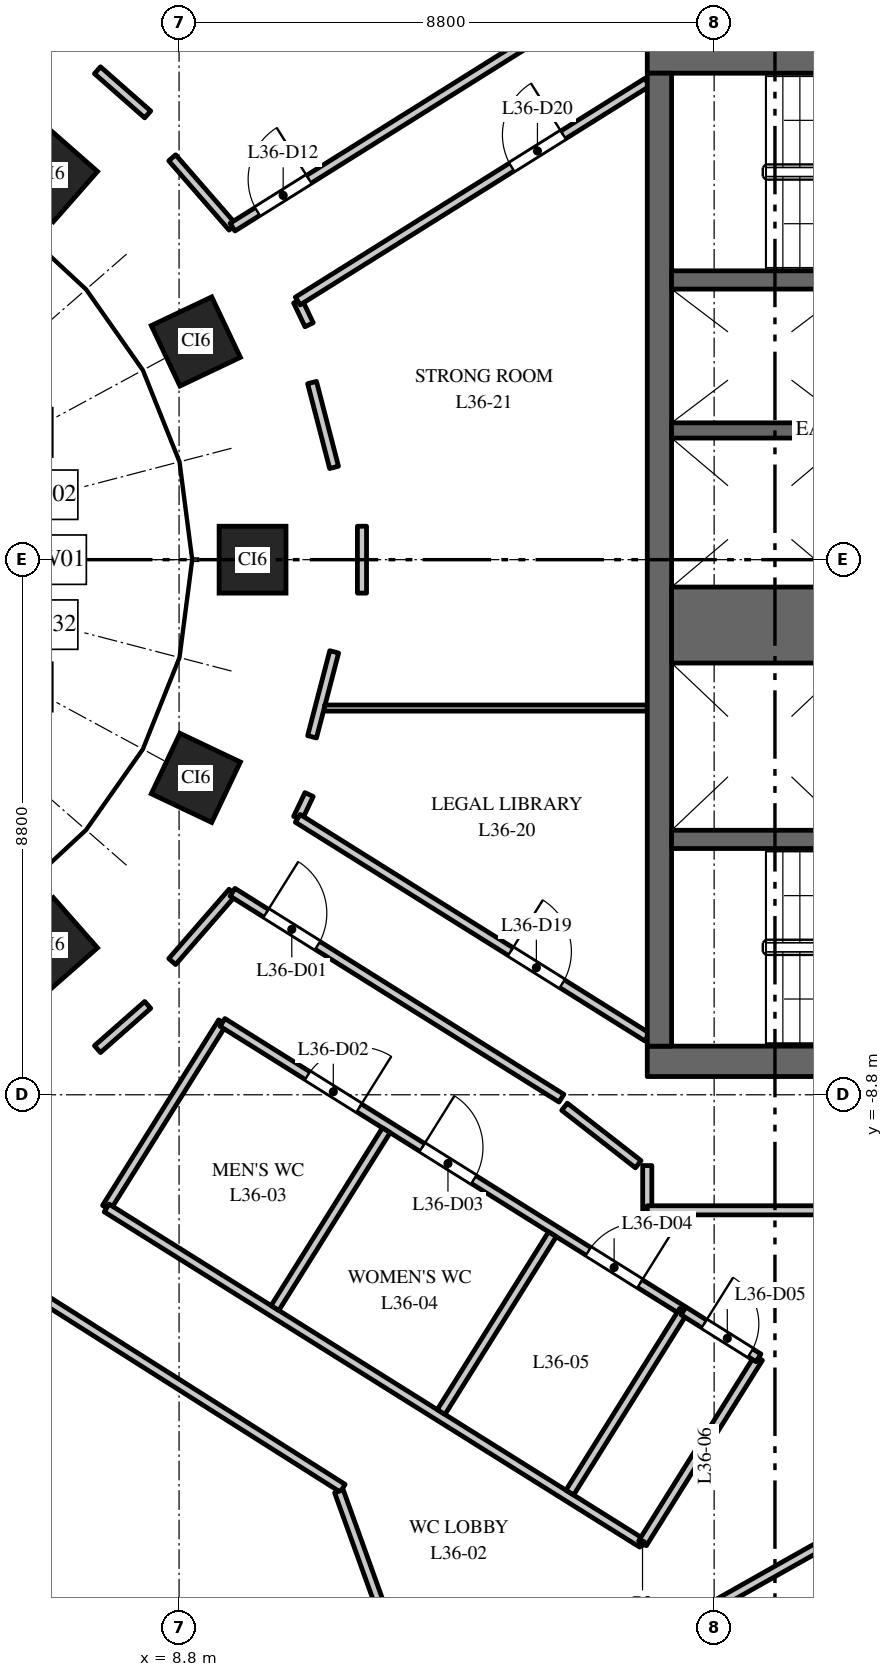
"""IFC4 building model, lengths in metres.
Left out: names, types, materials, properties, quantities, classifications, styles, units other than length and angle.
Written with IfcOpenShell. Run it as: python <this file> out.ifc"""

import sys

from ifc_helpers import new_model, si_unit, direction, frame, frame_2d, origin, origin_2d, place, context, subcontext, project, spatial, rectangle, extrude, element, fill, save


model = new_model("IFC4")
c1 = context("Model", 3, precision=1e-05, world=origin(), true_north=direction((0.0, 1.0)))
c2 = subcontext(c1, "Body", "Model", "MODEL_VIEW")
j1 = project(units=[si_unit("LENGTHUNIT", "METRE"), si_unit("PLANEANGLEUNIT", "RADIAN")], contexts=[c1])
p1 = place(None, origin())
s1 = spatial("IfcSite", under=j1, at=p1, CompositionType="ELEMENT")
p2 = place(p1, origin())
s2 = spatial("IfcBuilding", under=s1, at=p2, CompositionType="ELEMENT")
p3 = place(p2, frame((0.0, 0.0, 158.0)))
s3 = spatial("IfcBuildingStorey", under=s2, at=p3, CompositionType="ELEMENT", Elevation=158.0)
for number, where, z_axis, x_axis in (
    (1, (10.008, 0.0, 0.0), (0.0, 0.0, 1.0), (0.0, 1.0, 0.0)),
    (2, (9.076, 3.588, 0.0), (0.0, 0.0, 1.0), (-0.429, 0.903, 0.0)),
    (3, (6.682, 6.334, 0.0), (0.0, 0.0, 1.0), (-0.751, 0.66, 0.0)),
    (4, (6.682, -6.334, 0.0), (0.0, 0.0, 1.0), (0.751, 0.66, 0.0)),
    (5, (9.076, -3.588, 0.0), (0.0, 0.0, 1.0), (0.429, 0.903, 0.0)),
):
    element("IfcColumn", number, at=place(p3, frame(where, z_axis=z_axis, x_axis=x_axis)), inside=s3, PredefinedType="COLUMN", context=c2, shape_type="SweptSolid", body=[
        extrude(rectangle(XDim=1.1, YDim=1.1, at=origin_2d()), origin(), (0.0, 0.0, 1.0), 4.0),
    ])
p4 = place(p3, frame((16.5, 8.25, 0.0), z_axis=(0.0, 0.0, 1.0), x_axis=(1.0, 0.0, 0.0)))
e6 = element("IfcWall", 6, at=p4, inside=s3, PredefinedType="SHEAR", context=c2, shape_type="SweptSolid", body=[
    extrude(rectangle(XDim=15.0, YDim=0.5, at=frame_2d((7.5, 0.0))), origin(), (0.0, 0.0, 1.0), 3.7),
])
p5 = place(p4, frame((6.9, 0.0, 0.0)))
e7 = element("IfcOpeningElement", 7, at=p5, cuts=e6, PredefinedType="OPENING", context=c2, shape_type="SweptSolid", body=[
    extrude(rectangle(XDim=1.2, YDim=2.1, at=frame_2d((0.6, 1.05))), frame((0.0, 0.26, 0.0), z_axis=(0.0, -1.0, 0.0), x_axis=(1.0, 0.0, 0.0)), (0.0, 0.0, 1.0), 0.52),
])
p6 = place(p4, frame((12.425, 0.0, 0.0)))
e8 = element("IfcOpeningElement", 8, at=p6, cuts=e6, PredefinedType="OPENING", context=c2, shape_type="SweptSolid", body=[
    extrude(rectangle(XDim=0.9, YDim=2.1, at=frame_2d((0.45, 1.05))), frame((0.0, 0.26, 0.0), z_axis=(0.0, -1.0, 0.0), x_axis=(1.0, 0.0, 0.0)), (0.0, 0.0, 1.0), 0.52),
])
p7 = place(p3, frame((16.5, -8.25, 0.0), z_axis=(0.0, 0.0, 1.0), x_axis=(1.0, 0.0, 0.0)))
e9 = element("IfcWall", 9, at=p7, inside=s3, PredefinedType="SHEAR", context=c2, shape_type="SweptSolid", body=[
    extrude(rectangle(XDim=15.0, YDim=0.5, at=frame_2d((7.5, 0.0))), origin(), (0.0, 0.0, 1.0), 3.7),
])
p8 = place(p7, frame((6.9, 0.0, 0.0)))
e10 = element("IfcOpeningElement", 10, at=p8, cuts=e9, PredefinedType="OPENING", context=c2, shape_type="SweptSolid", body=[
    extrude(rectangle(XDim=1.2, YDim=2.1, at=frame_2d((0.6, 1.05))), frame((0.0, 0.26, 0.0), z_axis=(0.0, -1.0, 0.0), x_axis=(1.0, 0.0, 0.0)), (0.0, 0.0, 1.0), 0.52),
])
p9 = place(p7, frame((12.05, 0.0, 0.0)))
e11 = element("IfcOpeningElement", 11, at=p9, cuts=e9, PredefinedType="OPENING", context=c2, shape_type="SweptSolid", body=[
    extrude(rectangle(XDim=0.9, YDim=2.1, at=frame_2d((0.45, 1.05))), frame((0.0, 0.26, 0.0), z_axis=(0.0, -1.0, 0.0), x_axis=(1.0, 0.0, 0.0)), (0.0, 0.0, 1.0), 0.52),
])
p10 = place(p3, frame((16.7, -8.0, 0.0), z_axis=(0.0, 0.0, 1.0), x_axis=(0.0, 1.0, 0.0)))
e12 = element("IfcWall", 12, at=p10, inside=s3, PredefinedType="SHEAR", context=c2, shape_type="SweptSolid", body=[
    extrude(rectangle(XDim=16.0, YDim=0.4, at=frame_2d((8.0, 0.0))), origin(), (0.0, 0.0, 1.0), 3.7),
])
p11 = place(p3, frame((16.9, -1.075, 0.0), z_axis=(0.0, 0.0, 1.0), x_axis=(1.0, 0.0, 0.0)))
e13 = element("IfcWall", 13, at=p11, inside=s3, PredefinedType="SHEAR", context=c2, shape_type="SweptSolid", body=[
    extrude(rectangle(XDim=2.9, YDim=1.25, at=frame_2d((1.45, 0.0))), origin(), (0.0, 0.0, 1.0), 3.7),
])
p12 = place(p3, frame((16.9, 2.125, 0.0), z_axis=(0.0, 0.0, 1.0), x_axis=(1.0, 0.0, 0.0)))
e14 = element("IfcWall", 14, at=p12, inside=s3, PredefinedType="SHEAR", context=c2, shape_type="SweptSolid", body=[
    extrude(rectangle(XDim=2.9, YDim=0.25, at=frame_2d((1.45, 0.0))), origin(), (0.0, 0.0, 1.0), 3.7),
])
p13 = place(p3, frame((16.9, 4.6, 0.0), z_axis=(0.0, 0.0, 1.0), x_axis=(1.0, 0.0, 0.0)))
e15 = element("IfcWall", 15, at=p13, inside=s3, PredefinedType="SHEAR", context=c2, shape_type="SweptSolid", body=[
    extrude(rectangle(XDim=6.18, YDim=0.3, at=frame_2d((3.09, 0.0))), origin(), (0.0, 0.0, 1.0), 3.7),
])
p14 = place(p13, frame((4.9, 0.0, 0.0)))
e16 = element("IfcOpeningElement", 16, at=p14, cuts=e15, PredefinedType="OPENING", context=c2, shape_type="SweptSolid", body=[
    extrude(rectangle(XDim=1.1, YDim=2.1, at=frame_2d((0.55, 1.05))), frame((0.0, 0.16, 0.0), z_axis=(0.0, -1.0, 0.0), x_axis=(1.0, 0.0, 0.0)), (0.0, 0.0, 1.0), 0.32),
])
p15 = place(p3, frame((16.9, -4.6, 0.0), z_axis=(0.0, 0.0, 1.0), x_axis=(1.0, 0.0, 0.0)))
e17 = element("IfcWall", 17, at=p15, inside=s3, PredefinedType="SHEAR", context=c2, shape_type="SweptSolid", body=[
    extrude(rectangle(XDim=6.18, YDim=0.3, at=frame_2d((3.09, 0.0))), origin(), (0.0, 0.0, 1.0), 3.7),
])
p16 = place(p15, frame((4.9, 0.0, 0.0)))
e18 = element("IfcOpeningElement", 18, at=p16, cuts=e17, PredefinedType="OPENING", context=c2, shape_type="SweptSolid", body=[
    extrude(rectangle(XDim=1.1, YDim=2.1, at=frame_2d((0.55, 1.05))), frame((0.0, 0.16, 0.0), z_axis=(0.0, -1.0, 0.0), x_axis=(1.0, 0.0, 0.0)), (0.0, 0.0, 1.0), 0.32),
])
p17 = place(p3, frame((3.036, -9.915, 0.0), z_axis=(0.0, 0.0, 1.0), x_axis=(0.844814664865, -0.535059045367, 0.0)))
e19 = element("IfcWall", 19, at=p17, inside=s3, PredefinedType="PARTITIONING", context=c2, shape_type="SweptSolid", body=[
    extrude(rectangle(XDim=10.008, YDim=0.15, at=frame_2d((5.004, 0.0))), origin(), (0.0, 0.0, 1.0), 2.85),
])
for number, where, z_axis, x_axis in (
    (20, (7.458, -8.049, 0.0), (0.0, 0.0, 1.0), (0.751, 0.661, 0.0)),
    (21, (7.458, 8.049, 0.0), (0.0, 0.0, 1.0), (0.751, -0.661, 0.0)),
):
    element("IfcWall", number, at=place(p3, frame(where, z_axis=z_axis, x_axis=x_axis)), inside=s3, PredefinedType="PARTITIONING", context=c2, shape_type="SweptSolid", body=[
        extrude(rectangle(XDim=1.1, YDim=0.15, at=frame_2d((0.55, 0.0))), origin(), (0.0, 0.0, 1.0), 3.7),
    ])
p18 = place(p3, frame((7.605, -10.659, 0.0), z_axis=(0.0, 0.0, 1.0), x_axis=(0.530602380468, 0.847620855006, 0.0)))
e22 = element("IfcWall", 22, at=p18, inside=s3, PredefinedType="PARTITIONING", context=c2, shape_type="SweptSolid", body=[
    extrude(rectangle(XDim=3.6, YDim=0.15, at=frame_2d((1.8, 0.0))), origin(), (0.0, 0.0, 1.0), 3.7),
])
p19 = place(p3, frame((7.608, -10.661, 0.0), z_axis=(0.0, 0.0, 1.0), x_axis=(0.847562482532, -0.530695617284, 0.0)))
e23 = element("IfcWall", 23, at=p19, inside=s3, PredefinedType="PARTITIONING", context=c2, shape_type="SweptSolid", body=[
    extrude(rectangle(XDim=10.392, YDim=0.15, at=frame_2d((5.196, 0.0))), origin(), (0.0, 0.0, 1.0), 3.7),
])
for number, where, z_axis, x_axis in (
    (24, (8.687, -6.609, 0.0), (0.0, 0.0, 1.0), (0.656, 0.754, 0.0)),
    (25, (8.687, 6.609, 0.0), (0.0, 0.0, 1.0), (0.656, -0.754, 0.0)),
):
    element("IfcWall", number, at=place(p3, frame(where, z_axis=z_axis, x_axis=x_axis)), inside=s3, PredefinedType="PARTITIONING", context=c2, shape_type="SweptSolid", body=[
        extrude(rectangle(XDim=1.511, YDim=0.15, at=frame_2d((0.755, 0.0))), origin(), (0.0, 0.0, 1.0), 3.7),
    ])
p20 = place(p3, frame((9.514, -7.61, 0.0), z_axis=(0.0, 0.0, 1.0), x_axis=(0.847740567707, -0.530411095155, 0.0)))
e26 = element("IfcWall", 26, at=p20, inside=s3, PredefinedType="PARTITIONING", context=c2, shape_type="SweptSolid", body=[
    extrude(rectangle(XDim=8.944, YDim=0.15, at=frame_2d((4.472, 0.0))), origin(), (0.0, 0.0, 1.0), 3.7),
])
p21 = place(p20, frame((1.65, 0.0, 0.0)))
e27 = element("IfcOpeningElement", 27, at=p21, cuts=e26, PredefinedType="OPENING", context=c2, shape_type="SweptSolid", body=[
    extrude(rectangle(XDim=1.0, YDim=2.1, at=frame_2d((0.5, 1.05))), frame((0.0, 0.085, 0.0), z_axis=(0.0, -1.0, 0.0), x_axis=(1.0, 0.0, 0.0)), (0.0, 0.0, 1.0), 0.17),
])
p22 = place(p20, frame((3.874, 0.0, 0.0)))
e28 = element("IfcOpeningElement", 28, at=p22, cuts=e26, PredefinedType="OPENING", context=c2, shape_type="SweptSolid", body=[
    extrude(rectangle(XDim=1.0, YDim=2.1, at=frame_2d((0.5, 1.05))), frame((0.0, 0.085, 0.0), z_axis=(0.0, -1.0, 0.0), x_axis=(1.0, 0.0, 0.0)), (0.0, 0.0, 1.0), 0.17),
])
p23 = place(p20, frame((7.098, 0.0, 0.0)))
e29 = element("IfcOpeningElement", 29, at=p23, cuts=e26, PredefinedType="OPENING", context=c2, shape_type="SweptSolid", body=[
    extrude(rectangle(XDim=1.0, YDim=2.1, at=frame_2d((0.5, 1.05))), frame((0.0, 0.085, 0.0), z_axis=(0.0, -1.0, 0.0), x_axis=(1.0, 0.0, 0.0)), (0.0, 0.0, 1.0), 0.17),
])
p24 = place(p3, frame((9.679, -5.469, 0.0), z_axis=(0.0, 0.0, 1.0), x_axis=(0.847602682855, -0.530631408811, 0.0)))
e30 = element("IfcWall", 30, at=p24, inside=s3, PredefinedType="PARTITIONING", context=c2, shape_type="SweptSolid", body=[
    extrude(rectangle(XDim=6.383, YDim=0.15, at=frame_2d((3.191, 0.0))), origin(), (0.0, 0.0, 1.0), 3.7),
])
p25 = place(p24, frame((0.65, 0.0, 0.0)))
e31 = element("IfcOpeningElement", 31, at=p25, cuts=e30, PredefinedType="OPENING", context=c2, shape_type="SweptSolid", body=[
    extrude(rectangle(XDim=1.0, YDim=2.1, at=frame_2d((0.5, 1.05))), frame((0.0, 0.085, 0.0), z_axis=(0.0, -1.0, 0.0), x_axis=(1.0, 0.0, 0.0)), (0.0, 0.0, 1.0), 0.17),
])
p26 = place(p3, frame((9.679, 5.469, 0.0), z_axis=(0.0, 0.0, 1.0), x_axis=(0.847602682855, 0.530631408811, 0.0)))
e32 = element("IfcWall", 32, at=p26, inside=s3, PredefinedType="PARTITIONING", context=c2, shape_type="SweptSolid", body=[
    extrude(rectangle(XDim=6.383, YDim=0.15, at=frame_2d((3.191, 0.0))), origin(), (0.0, 0.0, 1.0), 3.7),
])
p27 = place(p26, frame((0.483, 0.0, 0.0)))
e33 = element("IfcOpeningElement", 33, at=p27, cuts=e32, PredefinedType="OPENING", context=c2, shape_type="SweptSolid", body=[
    extrude(rectangle(XDim=1.0, YDim=2.1, at=frame_2d((0.5, 1.05))), frame((0.0, 0.085, 0.0), z_axis=(0.0, -1.0, 0.0), x_axis=(1.0, 0.0, 0.0)), (0.0, 0.0, 1.0), 0.17),
])
p28 = place(p3, frame((10.377, -12.306, 0.0), z_axis=(0.0, 0.0, 1.0), x_axis=(0.530889428354, 0.847441098167, 0.0)))
e34 = element("IfcWall", 34, at=p28, inside=s3, PredefinedType="PARTITIONING", context=c2, shape_type="SweptSolid", body=[
    extrude(rectangle(XDim=3.449, YDim=0.15, at=frame_2d((1.725, 0.0))), origin(), (0.0, 0.0, 1.0), 3.7),
])
p29 = place(p3, frame((10.752, -4.254, 0.0), z_axis=(0.0, 0.0, 1.0), x_axis=(0.429758433873, 0.90294390109, 0.0)))
e35 = element("IfcWall", 35, at=p29, inside=s3, PredefinedType="PARTITIONING", context=c2, shape_type="SweptSolid", body=[
    extrude(rectangle(XDim=0.433, YDim=0.15, at=frame_2d((0.216, 0.0))), origin(), (0.0, 0.0, 1.0), 3.7),
])
p30 = place(p3, frame((10.752, -4.254, 0.0), z_axis=(0.0, 0.0, 1.0), x_axis=(0.847690706888, -0.530490777917, 0.0)))
e36 = element("IfcWall", 36, at=p30, inside=s3, PredefinedType="PARTITIONING", context=c2, shape_type="SweptSolid", body=[
    extrude(rectangle(XDim=6.781, YDim=0.15, at=frame_2d((3.39, 0.0))), origin(), (0.0, 0.0, 1.0), 3.7),
])
p31 = place(p30, frame((4.129, 0.0, 0.0)))
e37 = element("IfcOpeningElement", 37, at=p31, cuts=e36, PredefinedType="OPENING", context=c2, shape_type="SweptSolid", body=[
    extrude(rectangle(XDim=1.0, YDim=2.1, at=frame_2d((0.5, 1.05))), frame((0.0, 0.085, 0.0), z_axis=(0.0, -1.0, 0.0), x_axis=(1.0, 0.0, 0.0)), (0.0, 0.0, 1.0), 0.17),
])
p32 = place(p3, frame((10.752, 4.254, 0.0), z_axis=(0.0, 0.0, 1.0), x_axis=(0.429758433873, -0.90294390109, 0.0)))
e38 = element("IfcWall", 38, at=p32, inside=s3, PredefinedType="PARTITIONING", context=c2, shape_type="SweptSolid", body=[
    extrude(rectangle(XDim=0.433, YDim=0.15, at=frame_2d((0.216, 0.0))), origin(), (0.0, 0.0, 1.0), 3.7),
])
p33 = place(p3, frame((10.752, 4.254, 0.0), z_axis=(0.0, 0.0, 1.0), x_axis=(0.847690706888, 0.530490777917, 0.0)))
e39 = element("IfcWall", 39, at=p33, inside=s3, PredefinedType="PARTITIONING", context=c2, shape_type="SweptSolid", body=[
    extrude(rectangle(XDim=6.781, YDim=0.15, at=frame_2d((3.39, 0.0))), origin(), (0.0, 0.0, 1.0), 3.7),
])
p34 = place(p33, frame((4.15, 0.0, 0.0)))
e40 = element("IfcOpeningElement", 40, at=p34, cuts=e39, PredefinedType="OPENING", context=c2, shape_type="SweptSolid", body=[
    extrude(rectangle(XDim=1.0, YDim=2.1, at=frame_2d((0.5, 1.05))), frame((0.0, 0.085, 0.0), z_axis=(0.0, -1.0, 0.0), x_axis=(1.0, 0.0, 0.0)), (0.0, 0.0, 1.0), 0.17),
])
p35 = place(p3, frame((10.987, -2.913, 0.0), z_axis=(0.0, 0.0, 1.0), x_axis=(0.252153395539, 0.967687276509, 0.0)))
e41 = element("IfcWall", 41, at=p35, inside=s3, PredefinedType="PARTITIONING", context=c2, shape_type="SweptSolid", body=[
    extrude(rectangle(XDim=1.444, YDim=0.15, at=frame_2d((0.722, 0.0))), origin(), (0.0, 0.0, 1.0), 3.7),
])
p36 = place(p3, frame((10.987, 2.913, 0.0), z_axis=(0.0, 0.0, 1.0), x_axis=(0.251214938505, -0.967931327457, 0.0)))
e42 = element("IfcWall", 42, at=p36, inside=s3, PredefinedType="PARTITIONING", context=c2, shape_type="SweptSolid", body=[
    extrude(rectangle(XDim=1.441, YDim=0.15, at=frame_2d((0.721, 0.0))), origin(), (0.0, 0.0, 1.0), 3.7),
])
p37 = place(p3, frame((11.193, -2.44, 0.0), z_axis=(0.0, 0.0, 1.0), x_axis=(1.0, 0.0, 0.0)))
e43 = element("IfcWall", 43, at=p37, inside=s3, PredefinedType="PARTITIONING", context=c2, shape_type="SweptSolid", body=[
    extrude(rectangle(XDim=5.307, YDim=0.1, at=frame_2d((2.653, 0.0))), origin(), (0.0, 0.0, 1.0), 3.7),
])
p38 = place(p3, frame((11.429, -15.32, 0.0), z_axis=(0.0, 0.0, 1.0), x_axis=(0.338520464006, -0.940959029634, 0.0)))
e44 = element("IfcWall", 44, at=p38, inside=s3, PredefinedType="PARTITIONING", context=c2, shape_type="SweptSolid", body=[
    extrude(rectangle(XDim=4.735, YDim=0.15, at=frame_2d((2.368, 0.0))), origin(), (0.0, 0.0, 1.0), 3.7),
])
p39 = place(p3, frame((11.808, -0.55, 0.0), z_axis=(0.0, 0.0, 1.0), x_axis=(0.0, 1.0, 0.0)))
e45 = element("IfcWall", 45, at=p39, inside=s3, PredefinedType="PARTITIONING", context=c2, shape_type="SweptSolid", body=[
    extrude(rectangle(XDim=1.1, YDim=0.15, at=frame_2d((0.55, 0.0))), origin(), (0.0, 0.0, 1.0), 3.7),
])
p40 = place(p3, frame((13.034, -19.779, 0.0), z_axis=(0.0, 0.0, 1.0), x_axis=(0.870903388322, 0.491454258512, 0.0)))
e46 = element("IfcWall", 46, at=p40, inside=s3, PredefinedType="PARTITIONING", context=c2, shape_type="SweptSolid", body=[
    extrude(rectangle(XDim=10.955, YDim=0.15, at=frame_2d((5.478, 0.0))), origin(), (0.0, 0.0, 1.0), 3.7),
])
p41 = place(p3, frame((13.11, -14.017, 0.0), z_axis=(0.0, 0.0, 1.0), x_axis=(0.530603340991, 0.847620253727, 0.0)))
e47 = element("IfcWall", 47, at=p41, inside=s3, PredefinedType="PARTITIONING", context=c2, shape_type="SweptSolid", body=[
    extrude(rectangle(XDim=3.448, YDim=0.15, at=frame_2d((1.724, 0.0))), origin(), (0.0, 0.0, 1.0), 3.7),
])
p42 = place(p3, frame((15.226, -15.341, 0.0), z_axis=(0.0, 0.0, 1.0), x_axis=(0.530602850446, 0.847620560805, 0.0)))
e48 = element("IfcWall", 48, at=p42, inside=s3, PredefinedType="PARTITIONING", context=c2, shape_type="SweptSolid", body=[
    extrude(rectangle(XDim=3.524, YDim=0.15, at=frame_2d((1.762, 0.0))), origin(), (0.0, 0.0, 1.0), 3.7),
])
p43 = place(p3, frame((16.422, -16.175, 0.0), z_axis=(0.0, 0.0, 1.0), x_axis=(0.530578570881, 0.84763575911, 0.0)))
e49 = element("IfcWall", 49, at=p43, inside=s3, PredefinedType="PARTITIONING", context=c2, shape_type="SweptSolid", body=[
    extrude(rectangle(XDim=3.596, YDim=0.15, at=frame_2d((1.798, 0.0))), origin(), (0.0, 0.0, 1.0), 3.7),
])
p44 = place(p3, frame((16.5, -10.7, 0.0), z_axis=(0.0, 0.0, 1.0), x_axis=(0.0, 1.0, 0.0)))
e50 = element("IfcWall", 50, at=p44, inside=s3, PredefinedType="PARTITIONING", context=c2, shape_type="SweptSolid", body=[
    extrude(rectangle(XDim=0.736, YDim=0.15, at=frame_2d((0.368, 0.0))), origin(), (0.0, 0.0, 1.0), 3.7),
])
p45 = place(p3, frame((16.5, -10.7, 0.0), z_axis=(0.0, 0.0, 1.0), x_axis=(1.0, 0.0, 0.0)))
e51 = element("IfcWall", 51, at=p45, inside=s3, PredefinedType="PARTITIONING", context=c2, shape_type="SweptSolid", body=[
    extrude(rectangle(XDim=15.0, YDim=0.15, at=frame_2d((7.5, 0.0))), origin(), (0.0, 0.0, 1.0), 2.75),
])
p46 = place(p45, frame((4.345, 0.0, 0.0)))
e52 = element("IfcOpeningElement", 52, at=p46, cuts=e51, PredefinedType="OPENING", context=c2, shape_type="SweptSolid", body=[
    extrude(rectangle(XDim=1.0, YDim=2.1, at=frame_2d((0.5, 1.05))), frame((0.0, 0.085, 0.0), z_axis=(0.0, -1.0, 0.0), x_axis=(1.0, 0.0, 0.0)), (0.0, 0.0, 1.0), 0.17),
])
p47 = place(p45, frame((9.505, 0.0, 0.0)))
e53 = element("IfcOpeningElement", 53, at=p47, cuts=e51, PredefinedType="OPENING", context=c2, shape_type="SweptSolid", body=[
    extrude(rectangle(XDim=1.0, YDim=2.1, at=frame_2d((0.5, 1.05))), frame((0.0, 0.085, 0.0), z_axis=(0.0, -1.0, 0.0), x_axis=(1.0, 0.0, 0.0)), (0.0, 0.0, 1.0), 0.17),
])
p48 = place(p3, frame((17.096, -12.354, 0.0), z_axis=(0.0, 0.0, 1.0), x_axis=(0.847498728789, -0.530797423412, 0.0)))
e54 = element("IfcWall", 54, at=p48, inside=s3, PredefinedType="PARTITIONING", context=c2, shape_type="SweptSolid", body=[
    extrude(rectangle(XDim=1.456, YDim=0.15, at=frame_2d((0.728, 0.0))), origin(), (0.0, 0.0, 1.0), 3.7),
])
p49 = place(p48, frame((0.4, 0.0, 0.0)))
e55 = element("IfcOpeningElement", 55, at=p49, cuts=e54, PredefinedType="OPENING", context=c2, shape_type="SweptSolid", body=[
    extrude(rectangle(XDim=0.9, YDim=2.1, at=frame_2d((0.45, 1.05))), frame((0.0, 0.085, 0.0), z_axis=(0.0, -1.0, 0.0), x_axis=(1.0, 0.0, 0.0)), (0.0, 0.0, 1.0), 0.17),
])
p50 = place(p3, frame((16.352, -9.942, 0.0), z_axis=(0.0, 0.0, 1.0), x_axis=(-0.788950226826, 0.614457109643, 0.0)))
e56 = element("IfcWall", 56, at=p50, inside=s3, PredefinedType="PARTITIONING", context=c2, shape_type="SweptSolid", body=[
    extrude(rectangle(XDim=1.538, YDim=0.15, at=frame_2d((0.769, 0.0))), origin(), (0.0, 0.0, 1.0), 3.7),
])
p51 = place(p25, origin())
e57 = element("IfcDoor", 57, at=p51, inside=s3, OperationType="SINGLE_SWING_LEFT", PredefinedType="DOOR", context=c2, shape_type="SweptSolid", body=[
    extrude(rectangle(XDim=1.0, YDim=2.1, at=frame_2d((0.5, 1.05))), frame((0.0, 0.025, 0.0), z_axis=(0.0, -1.0, 0.0), x_axis=(1.0, 0.0, 0.0)), (0.0, 0.0, 1.0), 0.05),
])
fill(e31, e57)
p52 = place(p21, origin())
e58 = element("IfcDoor", 58, at=p52, inside=s3, OperationType="SINGLE_SWING_RIGHT", PredefinedType="DOOR", context=c2, shape_type="SweptSolid", body=[
    extrude(rectangle(XDim=1.0, YDim=2.1, at=frame_2d((0.5, 1.05))), frame((0.0, 0.025, 0.0), z_axis=(0.0, -1.0, 0.0), x_axis=(1.0, 0.0, 0.0)), (0.0, 0.0, 1.0), 0.05),
])
fill(e27, e58)
p53 = place(p22, origin())
e59 = element("IfcDoor", 59, at=p53, inside=s3, OperationType="SINGLE_SWING_LEFT", PredefinedType="DOOR", context=c2, shape_type="SweptSolid", body=[
    extrude(rectangle(XDim=1.0, YDim=2.1, at=frame_2d((0.5, 1.05))), frame((0.0, 0.025, 0.0), z_axis=(0.0, -1.0, 0.0), x_axis=(1.0, 0.0, 0.0)), (0.0, 0.0, 1.0), 0.05),
])
fill(e28, e59)
p54 = place(p23, origin())
e60 = element("IfcDoor", 60, at=p54, inside=s3, OperationType="SINGLE_SWING_RIGHT", PredefinedType="DOOR", context=c2, shape_type="SweptSolid", body=[
    extrude(rectangle(XDim=1.0, YDim=2.1, at=frame_2d((0.5, 1.05))), frame((0.0, 0.025, 0.0), z_axis=(0.0, -1.0, 0.0), x_axis=(1.0, 0.0, 0.0)), (0.0, 0.0, 1.0), 0.05),
])
fill(e29, e60)
p55 = place(p49, origin())
e61 = element("IfcDoor", 61, at=p55, inside=s3, OperationType="SINGLE_SWING_LEFT", PredefinedType="DOOR", context=c2, shape_type="SweptSolid", body=[
    extrude(rectangle(XDim=0.9, YDim=2.1, at=frame_2d((0.45, 1.05))), frame((0.0, 0.025, 0.0), z_axis=(0.0, -1.0, 0.0), x_axis=(1.0, 0.0, 0.0)), (0.0, 0.0, 1.0), 0.05),
])
fill(e55, e61)
p56 = place(p27, origin())
e62 = element("IfcDoor", 62, at=p56, inside=s3, OperationType="SINGLE_SWING_RIGHT", PredefinedType="DOOR", context=c2, shape_type="SweptSolid", body=[
    extrude(rectangle(XDim=1.0, YDim=2.1, at=frame_2d((0.5, 1.05))), frame((0.0, 0.025, 0.0), z_axis=(0.0, -1.0, 0.0), x_axis=(1.0, 0.0, 0.0)), (0.0, 0.0, 1.0), 0.05),
])
fill(e33, e62)
p57 = place(p31, origin())
e63 = element("IfcDoor", 63, at=p57, inside=s3, OperationType="SINGLE_SWING_LEFT", PredefinedType="DOOR", context=c2, shape_type="SweptSolid", body=[
    extrude(rectangle(XDim=1.0, YDim=2.1, at=frame_2d((0.5, 1.05))), frame((0.0, 0.025, 0.0), z_axis=(0.0, -1.0, 0.0), x_axis=(1.0, 0.0, 0.0)), (0.0, 0.0, 1.0), 0.05),
])
fill(e37, e63)
p58 = place(p34, origin())
e64 = element("IfcDoor", 64, at=p58, inside=s3, OperationType="SINGLE_SWING_RIGHT", PredefinedType="DOOR", context=c2, shape_type="SweptSolid", body=[
    extrude(rectangle(XDim=1.0, YDim=2.1, at=frame_2d((0.5, 1.05))), frame((0.0, 0.025, 0.0), z_axis=(0.0, -1.0, 0.0), x_axis=(1.0, 0.0, 0.0)), (0.0, 0.0, 1.0), 0.05),
])
fill(e40, e64)
save(model, sys.argv[1])
